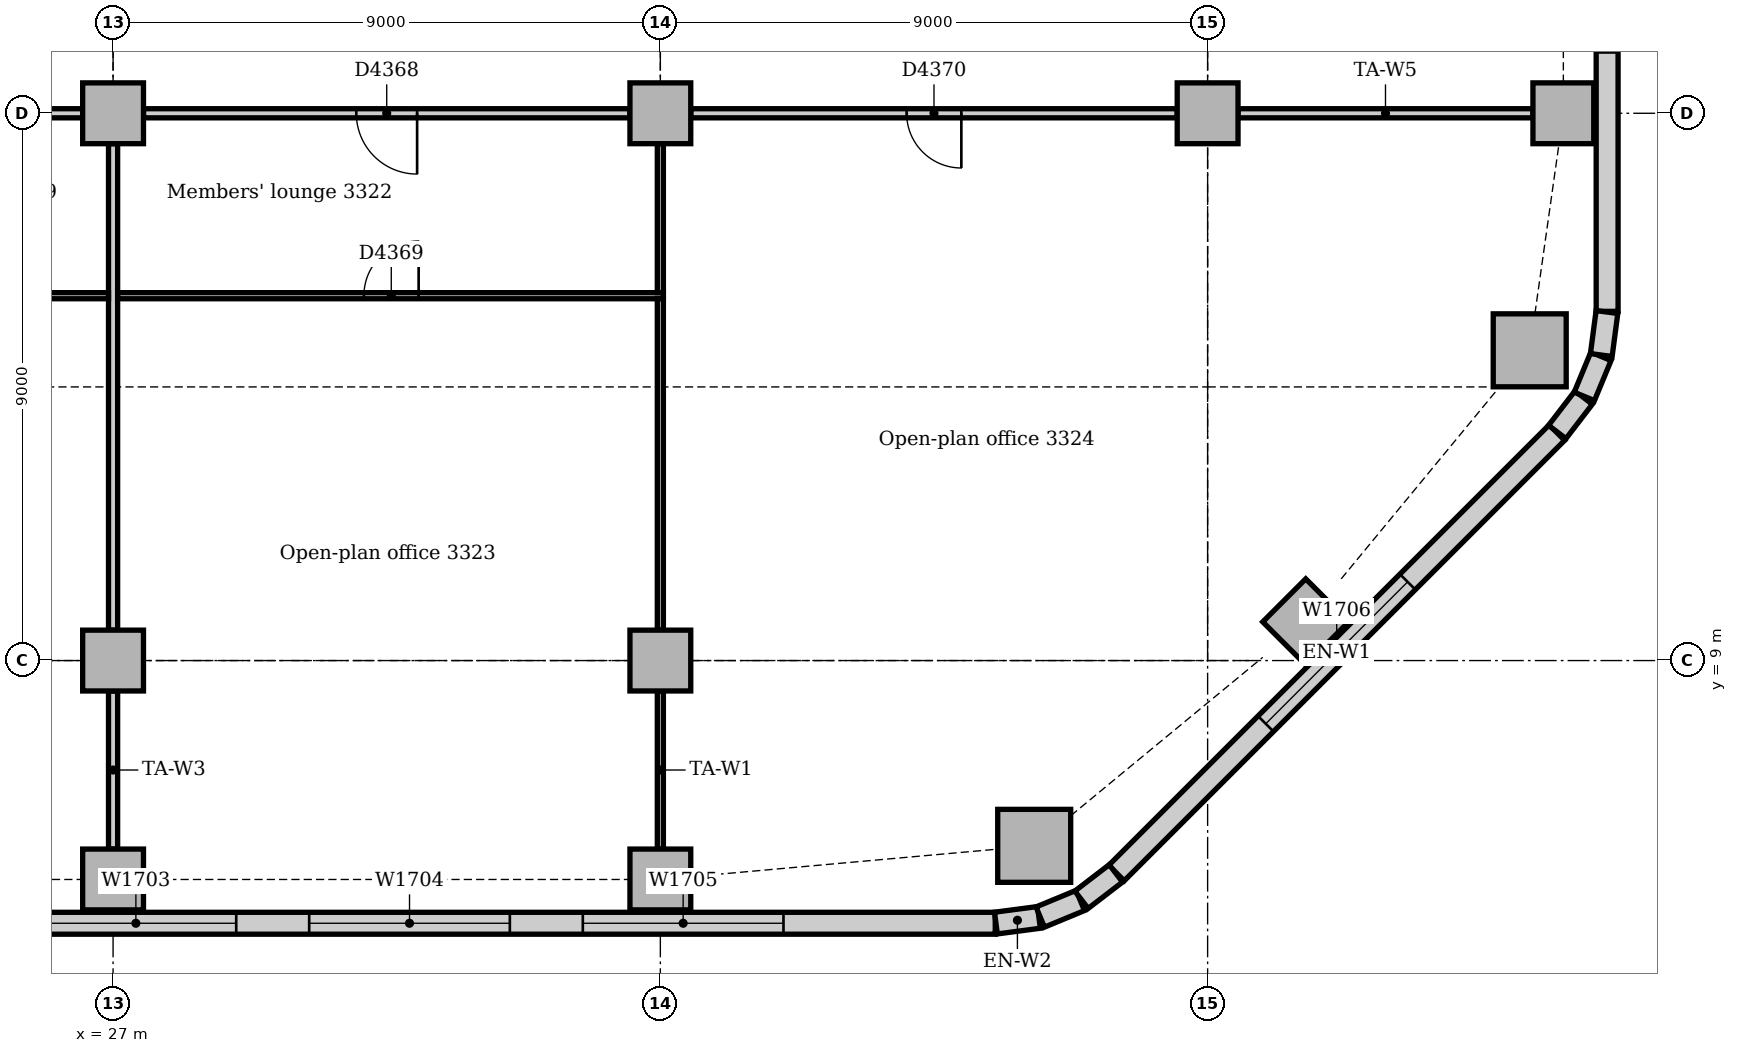
"""IFC4 building model, lengths in metres.
Left out: names, types, materials, properties, quantities, classifications, styles, units other than length and angle.
Written with IfcOpenShell. Run it as: python <this file> out.ifc"""

import sys

from ifc_helpers import new_model, si_unit, direction, frame, frame_2d, origin, origin_2d, place, context, subcontext, project, spatial, rectangle, extrude, element, fill, save


model = new_model("IFC4")
c1 = context("Model", 3, precision=1e-05, world=origin(), true_north=direction((0.0, 1.0)))
c2 = subcontext(c1, "Body", "Model", "MODEL_VIEW")
j1 = project(units=[si_unit("LENGTHUNIT", "METRE"), si_unit("PLANEANGLEUNIT", "RADIAN")], contexts=[c1])
p1 = place(None, origin())
s1 = spatial("IfcSite", under=j1, at=p1, CompositionType="ELEMENT")
p2 = place(p1, origin())
s2 = spatial("IfcBuilding", under=s1, at=p2, CompositionType="ELEMENT")
p3 = place(p2, frame((0.0, 0.0, 140.0)))
s3 = spatial("IfcBuildingStorey", under=s2, at=p3, CompositionType="ELEMENT", Elevation=140.0)
for number, where, z_axis, x_axis in (
    (1, (42.148, 5.953, 0.0), (0.0, 0.0, 1.0), (1.0, 0.0, 0.0)),
    (2, (50.297, 14.102, 0.0), (0.0, 0.0, 1.0), (1.0, 0.0, 0.0)),
):
    element("IfcColumn", number, at=place(p3, frame(where, z_axis=z_axis, x_axis=x_axis)), inside=s3, PredefinedType="COLUMN", context=c2, shape_type="SweptSolid", body=[
        extrude(rectangle(XDim=1.2, YDim=1.2, at=origin_2d()), origin(), (0.0, 0.0, 1.0), 3.7),
    ])
for number, where, z_axis, x_axis in (
    (3, (27.0, 5.4, 0.0), (0.0, 0.0, 1.0), (1.0, 0.0, 0.0)),
    (4, (36.0, 5.4, 0.0), (0.0, 0.0, 1.0), (1.0, 0.0, 0.0)),
    (5, (46.614, 9.636, 0.0), (0.0, 0.0, 1.0), (0.707, 0.707, 0.0)),
    (6, (50.85, 18.0, 0.0), (0.0, 0.0, 1.0), (1.0, 0.0, 0.0)),
    (7, (27.0, 9.0, 0.0), (0.0, 0.0, 1.0), (1.0, 0.0, 0.0)),
    (8, (27.0, 18.0, 0.0), (0.0, 0.0, 1.0), (1.0, 0.0, 0.0)),
    (9, (36.0, 9.0, 0.0), (0.0, 0.0, 1.0), (1.0, 0.0, 0.0)),
    (10, (36.0, 18.0, 0.0), (0.0, 0.0, 1.0), (1.0, 0.0, 0.0)),
    (11, (45.0, 18.0, 0.0), (0.0, 0.0, 1.0), (1.0, 0.0, 0.0)),
):
    element("IfcColumn", number, at=place(p3, frame(where, z_axis=z_axis, x_axis=x_axis)), inside=s3, PredefinedType="COLUMN", context=c2, shape_type="SweptSolid", body=[
        extrude(rectangle(XDim=1.0, YDim=1.0, at=origin_2d()), origin(), (0.0, 0.0, 1.0), 3.7),
    ])
p4 = place(p3, frame((4.243, 4.68, 0.0), z_axis=(0.0, 0.0, 1.0), x_axis=(1.0, 0.0, 0.0)))
e12 = element("IfcWall", 12, at=p4, inside=s3, PredefinedType="STANDARD", context=c2, shape_type="SweptSolid", body=[
    extrude(rectangle(XDim=37.265, YDim=0.36, at=frame_2d((18.632, 0.0))), origin(), (0.0, 0.0, 1.0), 3.7),
])
p5 = place(p4, frame((3.482, 0.0, 0.9)))
e13 = element("IfcOpeningElement", 13, at=p5, cuts=e12, PredefinedType="OPENING", context=c2, shape_type="SweptSolid", body=[
    extrude(rectangle(XDim=3.3, YDim=1.6, at=frame_2d((1.65, 0.8))), frame((0.0, 0.19, 0.0), z_axis=(0.0, -1.0, 0.0), x_axis=(1.0, 0.0, 0.0)), (0.0, 0.0, 1.0), 0.38),
])
p6 = place(p4, frame((7.982, 0.0, 0.9)))
e14 = element("IfcOpeningElement", 14, at=p6, cuts=e12, PredefinedType="OPENING", context=c2, shape_type="SweptSolid", body=[
    extrude(rectangle(XDim=3.3, YDim=1.6, at=frame_2d((1.65, 0.8))), frame((0.0, 0.19, 0.0), z_axis=(0.0, -1.0, 0.0), x_axis=(1.0, 0.0, 0.0)), (0.0, 0.0, 1.0), 0.38),
])
p7 = place(p4, frame((12.482, 0.0, 0.9)))
e15 = element("IfcOpeningElement", 15, at=p7, cuts=e12, PredefinedType="OPENING", context=c2, shape_type="SweptSolid", body=[
    extrude(rectangle(XDim=3.3, YDim=1.6, at=frame_2d((1.65, 0.8))), frame((0.0, 0.19, 0.0), z_axis=(0.0, -1.0, 0.0), x_axis=(1.0, 0.0, 0.0)), (0.0, 0.0, 1.0), 0.38),
])
p8 = place(p4, frame((16.982, 0.0, 0.9)))
e16 = element("IfcOpeningElement", 16, at=p8, cuts=e12, PredefinedType="OPENING", context=c2, shape_type="SweptSolid", body=[
    extrude(rectangle(XDim=3.3, YDim=1.6, at=frame_2d((1.65, 0.8))), frame((0.0, 0.19, 0.0), z_axis=(0.0, -1.0, 0.0), x_axis=(1.0, 0.0, 0.0)), (0.0, 0.0, 1.0), 0.38),
])
p9 = place(p4, frame((21.482, 0.0, 0.9)))
e17 = element("IfcOpeningElement", 17, at=p9, cuts=e12, PredefinedType="OPENING", context=c2, shape_type="SweptSolid", body=[
    extrude(rectangle(XDim=3.3, YDim=1.6, at=frame_2d((1.65, 0.8))), frame((0.0, 0.19, 0.0), z_axis=(0.0, -1.0, 0.0), x_axis=(1.0, 0.0, 0.0)), (0.0, 0.0, 1.0), 0.38),
])
p10 = place(p4, frame((25.982, 0.0, 0.9)))
e18 = element("IfcOpeningElement", 18, at=p10, cuts=e12, PredefinedType="OPENING", context=c2, shape_type="SweptSolid", body=[
    extrude(rectangle(XDim=3.3, YDim=1.6, at=frame_2d((1.65, 0.8))), frame((0.0, 0.19, 0.0), z_axis=(0.0, -1.0, 0.0), x_axis=(1.0, 0.0, 0.0)), (0.0, 0.0, 1.0), 0.38),
])
p11 = place(p4, frame((30.482, 0.0, 0.9)))
e19 = element("IfcOpeningElement", 19, at=p11, cuts=e12, PredefinedType="OPENING", context=c2, shape_type="SweptSolid", body=[
    extrude(rectangle(XDim=3.3, YDim=1.6, at=frame_2d((1.65, 0.8))), frame((0.0, 0.19, 0.0), z_axis=(0.0, -1.0, 0.0), x_axis=(1.0, 0.0, 0.0)), (0.0, 0.0, 1.0), 0.38),
])
p12 = place(p3, frame((43.501, 5.506, 0.0), z_axis=(0.0, 0.0, 1.0), x_axis=(0.707106781187, 0.707106781187, 0.0)))
e20 = element("IfcWall", 20, at=p12, inside=s3, PredefinedType="STANDARD", context=c2, shape_type="SweptSolid", body=[
    extrude(rectangle(XDim=10.243, YDim=0.36, at=frame_2d((5.121, 0.0))), origin(), (0.0, 0.0, 1.0), 3.7),
])
p13 = place(p12, frame((3.471, 0.0, 0.9)))
e21 = element("IfcOpeningElement", 21, at=p13, cuts=e20, PredefinedType="OPENING", context=c2, shape_type="SweptSolid", body=[
    extrude(rectangle(XDim=3.3, YDim=1.6, at=frame_2d((1.65, 0.8))), frame((0.0, 0.19, 0.0), z_axis=(0.0, -1.0, 0.0), x_axis=(1.0, 0.0, 0.0)), (0.0, 0.0, 1.0), 0.38),
])
p14 = place(p3, frame((51.57, 14.743, 0.0), z_axis=(0.0, 0.0, 1.0), x_axis=(0.0, 1.0, 0.0)))
e22 = element("IfcWall", 22, at=p14, inside=s3, PredefinedType="STANDARD", context=c2, shape_type="SweptSolid", body=[
    extrude(rectangle(XDim=24.515, YDim=0.36, at=frame_2d((12.257, 0.0))), origin(), (0.0, 0.0, 1.0), 3.7),
])
p15 = place(p14, frame((4.257, 0.0, 0.9)))
e23 = element("IfcOpeningElement", 23, at=p15, cuts=e22, PredefinedType="OPENING", context=c2, shape_type="SweptSolid", body=[
    extrude(rectangle(XDim=1.8, YDim=1.6, at=frame_2d((0.9, 0.8))), frame((0.0, 0.19, 0.0), z_axis=(0.0, -1.0, 0.0), x_axis=(1.0, 0.0, 0.0)), (0.0, 0.0, 1.0), 0.38),
])
p16 = place(p14, frame((8.357, 0.0, 0.9)))
e24 = element("IfcOpeningElement", 24, at=p16, cuts=e22, PredefinedType="OPENING", context=c2, shape_type="SweptSolid", body=[
    extrude(rectangle(XDim=3.3, YDim=1.6, at=frame_2d((1.65, 0.8))), frame((0.0, 0.19, 0.0), z_axis=(0.0, -1.0, 0.0), x_axis=(1.0, 0.0, 0.0)), (0.0, 0.0, 1.0), 0.38),
])
p17 = place(p14, frame((12.857, 0.0, 0.9)))
e25 = element("IfcOpeningElement", 25, at=p17, cuts=e22, PredefinedType="OPENING", context=c2, shape_type="SweptSolid", body=[
    extrude(rectangle(XDim=3.3, YDim=1.6, at=frame_2d((1.65, 0.8))), frame((0.0, 0.19, 0.0), z_axis=(0.0, -1.0, 0.0), x_axis=(1.0, 0.0, 0.0)), (0.0, 0.0, 1.0), 0.38),
])
p18 = place(p14, frame((17.357, 0.0, 0.9)))
e26 = element("IfcOpeningElement", 26, at=p18, cuts=e22, PredefinedType="OPENING", context=c2, shape_type="SweptSolid", body=[
    extrude(rectangle(XDim=3.3, YDim=1.6, at=frame_2d((1.65, 0.8))), frame((0.0, 0.19, 0.0), z_axis=(0.0, -1.0, 0.0), x_axis=(1.0, 0.0, 0.0)), (0.0, 0.0, 1.0), 0.38),
])
for number, where, z_axis, x_axis in (
    (27, (41.519, 4.683, 0.0), (0.0, 0.0, 1.0), (0.991, 0.131, 0.0)),
    (28, (42.247, 4.782, 0.0), (0.0, 0.0, 1.0), (0.924, 0.383, 0.0)),
):
    element("IfcWall", number, at=place(p3, frame(where, z_axis=z_axis, x_axis=x_axis)), inside=s3, PredefinedType="STANDARD", context=c2, shape_type="SweptSolid", body=[
        extrude(rectangle(XDim=0.713, YDim=0.36, at=frame_2d((0.356, 0.0))), origin(), (0.0, 0.0, 1.0), 3.7),
    ])
for number, where, z_axis, x_axis in (
    (29, (42.925, 5.066, 0.0), (0.0, 0.0, 1.0), (0.793, 0.609, 0.0)),
    (30, (50.75, 12.759, 0.0), (0.0, 0.0, 1.0), (0.609, 0.793, 0.0)),
):
    element("IfcWall", number, at=place(p3, frame(where, z_axis=z_axis, x_axis=x_axis)), inside=s3, PredefinedType="STANDARD", context=c2, shape_type="SweptSolid", body=[
        extrude(rectangle(XDim=0.713, YDim=0.36, at=frame_2d((0.357, 0.0))), origin(), (0.0, 0.0, 1.0), 3.7),
    ])
for number, where, z_axis, x_axis in (
    (31, (51.195, 13.344, 0.0), (0.0, 0.0, 1.0), (0.383, 0.924, 0.0)),
    (32, (51.474, 14.024, 0.0), (0.0, 0.0, 1.0), (0.131, 0.991, 0.0)),
):
    element("IfcWall", number, at=place(p3, frame(where, z_axis=z_axis, x_axis=x_axis)), inside=s3, PredefinedType="STANDARD", context=c2, shape_type="SweptSolid", body=[
        extrude(rectangle(XDim=0.713, YDim=0.36, at=frame_2d((0.356, 0.0))), origin(), (0.0, 0.0, 1.0), 3.7),
    ])
p19 = place(p3, frame((45.5, 18.0, 0.0), z_axis=(0.0, 0.0, 1.0), x_axis=(1.0, 0.0, 0.0)))
e33 = element("IfcWall", 33, at=p19, inside=s3, PredefinedType="PARTITIONING", context=c2, shape_type="SweptSolid", body=[
    extrude(rectangle(XDim=4.85, YDim=0.15, at=frame_2d((2.425, 0.0))), origin(), (0.0, 0.0, 1.0), 3.104),
])
p20 = place(p3, frame((36.5, 18.0, 0.0), z_axis=(0.0, 0.0, 1.0), x_axis=(1.0, 0.0, 0.0)))
e34 = element("IfcWall", 34, at=p20, inside=s3, PredefinedType="PARTITIONING", context=c2, shape_type="SweptSolid", body=[
    extrude(rectangle(XDim=8.0, YDim=0.15, at=frame_2d((4.0, 0.0))), origin(), (0.0, 0.0, 1.0), 3.008),
])
p21 = place(p20, frame((3.55, 0.0, 0.0)))
e35 = element("IfcOpeningElement", 35, at=p21, cuts=e34, PredefinedType="OPENING", context=c2, shape_type="SweptSolid", body=[
    extrude(rectangle(XDim=0.9, YDim=2.1, at=frame_2d((0.45, 1.05))), frame((0.0, 0.085, 0.0), z_axis=(0.0, -1.0, 0.0), x_axis=(1.0, 0.0, 0.0)), (0.0, 0.0, 1.0), 0.17),
])
p22 = place(p3, frame((27.5, 18.0, 0.0), z_axis=(0.0, 0.0, 1.0), x_axis=(1.0, 0.0, 0.0)))
e36 = element("IfcWall", 36, at=p22, inside=s3, PredefinedType="PARTITIONING", context=c2, shape_type="SweptSolid", body=[
    extrude(rectangle(XDim=8.0, YDim=0.15, at=frame_2d((4.0, 0.0))), origin(), (0.0, 0.0, 1.0), 3.008),
])
p23 = place(p22, frame((3.5, 0.0, 0.0)))
e37 = element("IfcOpeningElement", 37, at=p23, cuts=e36, PredefinedType="OPENING", context=c2, shape_type="SweptSolid", body=[
    extrude(rectangle(XDim=1.0, YDim=2.1, at=frame_2d((0.5, 1.05))), frame((0.0, 0.085, 0.0), z_axis=(0.0, -1.0, 0.0), x_axis=(1.0, 0.0, 0.0)), (0.0, 0.0, 1.0), 0.17),
])
p24 = place(p3, frame((18.5, 18.0, 0.0), z_axis=(0.0, 0.0, 1.0), x_axis=(1.0, 0.0, 0.0)))
e38 = element("IfcWall", 38, at=p24, inside=s3, PredefinedType="PARTITIONING", context=c2, shape_type="SweptSolid", body=[
    extrude(rectangle(XDim=8.0, YDim=0.15, at=frame_2d((4.0, 0.0))), origin(), (0.0, 0.0, 1.0), 3.008),
])
p25 = place(p24, frame((3.5, 0.0, 0.0)))
e39 = element("IfcOpeningElement", 39, at=p25, cuts=e38, PredefinedType="OPENING", context=c2, shape_type="SweptSolid", body=[
    extrude(rectangle(XDim=1.0, YDim=2.1, at=frame_2d((0.5, 1.05))), frame((0.0, 0.085, 0.0), z_axis=(0.0, -1.0, 0.0), x_axis=(1.0, 0.0, 0.0)), (0.0, 0.0, 1.0), 0.17),
])
p26 = place(p3, frame((27.0, 5.9, 0.0), z_axis=(0.0, 0.0, 1.0), x_axis=(0.0, 1.0, 0.0)))
e40 = element("IfcWall", 40, at=p26, inside=s3, PredefinedType="PARTITIONING", context=c2, shape_type="SweptSolid", body=[
    extrude(rectangle(XDim=2.6, YDim=0.15, at=frame_2d((1.3, 0.0))), origin(), (0.0, 0.0, 1.0), 3.502),
])
p27 = place(p3, frame((27.0, 9.5, 0.0), z_axis=(0.0, 0.0, 1.0), x_axis=(0.0, 1.0, 0.0)))
e41 = element("IfcWall", 41, at=p27, inside=s3, PredefinedType="PARTITIONING", context=c2, shape_type="SweptSolid", body=[
    extrude(rectangle(XDim=8.0, YDim=0.15, at=frame_2d((4.0, 0.0))), origin(), (0.0, 0.0, 1.0), 3.106),
])
p28 = place(p3, frame((8.95, 15.0, 0.0), z_axis=(0.0, 0.0, 1.0), x_axis=(1.0, 0.0, 0.0)))
e42 = element("IfcWall", 42, at=p28, inside=s3, PredefinedType="PARTITIONING", context=c2, shape_type="SweptSolid", body=[
    extrude(rectangle(XDim=17.975, YDim=0.1, at=frame_2d((8.988, 0.0))), origin(), (0.0, 0.0, 1.0), 3.7),
])
p29 = place(p28, frame((4.15, 0.0, 0.0)))
e43 = element("IfcOpeningElement", 43, at=p29, cuts=e42, PredefinedType="OPENING", context=c2, shape_type="SweptSolid", body=[
    extrude(rectangle(XDim=0.9, YDim=2.1, at=frame_2d((0.45, 1.05))), frame((0.0, 0.06, 0.0), z_axis=(0.0, -1.0, 0.0), x_axis=(1.0, 0.0, 0.0)), (0.0, 0.0, 1.0), 0.12),
])
p30 = place(p28, frame((13.0, 0.0, 0.0)))
e44 = element("IfcOpeningElement", 44, at=p30, cuts=e42, PredefinedType="OPENING", context=c2, shape_type="SweptSolid", body=[
    extrude(rectangle(XDim=0.9, YDim=2.1, at=frame_2d((0.45, 1.05))), frame((0.0, 0.06, 0.0), z_axis=(0.0, -1.0, 0.0), x_axis=(1.0, 0.0, 0.0)), (0.0, 0.0, 1.0), 0.12),
])
p31 = place(p3, frame((27.075, 15.0, 0.0), z_axis=(0.0, 0.0, 1.0), x_axis=(1.0, 0.0, 0.0)))
e45 = element("IfcWall", 45, at=p31, inside=s3, PredefinedType="PARTITIONING", context=c2, shape_type="SweptSolid", body=[
    extrude(rectangle(XDim=8.975, YDim=0.1, at=frame_2d((4.487, 0.0))), origin(), (0.0, 0.0, 1.0), 3.7),
])
p32 = place(p31, frame((4.05, 0.0, 0.0)))
e46 = element("IfcOpeningElement", 46, at=p32, cuts=e45, PredefinedType="OPENING", context=c2, shape_type="SweptSolid", body=[
    extrude(rectangle(XDim=0.9, YDim=2.1, at=frame_2d((0.45, 1.05))), frame((0.0, 0.06, 0.0), z_axis=(0.0, -1.0, 0.0), x_axis=(1.0, 0.0, 0.0)), (0.0, 0.0, 1.0), 0.12),
])
p33 = place(p3, frame((36.0, 5.9, 0.0), z_axis=(0.0, 0.0, 1.0), x_axis=(0.0, 1.0, 0.0)))
e47 = element("IfcWall", 47, at=p33, inside=s3, PredefinedType="PARTITIONING", context=c2, shape_type="SweptSolid", body=[
    extrude(rectangle(XDim=2.6, YDim=0.1, at=frame_2d((1.3, 0.0))), origin(), (0.0, 0.0, 1.0), 3.502),
])
p34 = place(p3, frame((36.0, 15.05, 0.0), z_axis=(0.0, 0.0, 1.0), x_axis=(0.0, 1.0, 0.0)))
e48 = element("IfcWall", 48, at=p34, inside=s3, PredefinedType="PARTITIONING", context=c2, shape_type="SweptSolid", body=[
    extrude(rectangle(XDim=2.45, YDim=0.1, at=frame_2d((1.225, 0.0))), origin(), (0.0, 0.0, 1.0), 3.106),
])
p35 = place(p3, frame((36.0, 9.5, 0.0), z_axis=(0.0, 0.0, 1.0), x_axis=(0.0, 1.0, 0.0)))
e49 = element("IfcWall", 49, at=p35, inside=s3, PredefinedType="PARTITIONING", context=c2, shape_type="SweptSolid", body=[
    extrude(rectangle(XDim=5.45, YDim=0.1, at=frame_2d((2.725, 0.0))), origin(), (0.0, 0.0, 1.0), 3.106),
])
p36 = place(p9, origin())
e50 = element("IfcWindow", 50, at=p36, inside=s3, PartitioningType="SINGLE_PANEL", PredefinedType="WINDOW", context=c2, shape_type="SweptSolid", body=[
    extrude(rectangle(XDim=3.3, YDim=1.6, at=frame_2d((1.65, 0.8))), frame((0.0, 0.13, 0.0), z_axis=(0.0, -1.0, 0.0), x_axis=(1.0, 0.0, 0.0)), (0.0, 0.0, 1.0), 0.06),
])
fill(e17, e50)
p37 = place(p10, origin())
e51 = element("IfcWindow", 51, at=p37, inside=s3, PartitioningType="SINGLE_PANEL", PredefinedType="WINDOW", context=c2, shape_type="SweptSolid", body=[
    extrude(rectangle(XDim=3.3, YDim=1.6, at=frame_2d((1.65, 0.8))), frame((0.0, 0.13, 0.0), z_axis=(0.0, -1.0, 0.0), x_axis=(1.0, 0.0, 0.0)), (0.0, 0.0, 1.0), 0.06),
])
fill(e18, e51)
p38 = place(p11, origin())
e52 = element("IfcWindow", 52, at=p38, inside=s3, PartitioningType="SINGLE_PANEL", PredefinedType="WINDOW", context=c2, shape_type="SweptSolid", body=[
    extrude(rectangle(XDim=3.3, YDim=1.6, at=frame_2d((1.65, 0.8))), frame((0.0, 0.13, 0.0), z_axis=(0.0, -1.0, 0.0), x_axis=(1.0, 0.0, 0.0)), (0.0, 0.0, 1.0), 0.06),
])
fill(e19, e52)
p39 = place(p13, origin())
e53 = element("IfcWindow", 53, at=p39, inside=s3, PartitioningType="SINGLE_PANEL", PredefinedType="WINDOW", context=c2, shape_type="SweptSolid", body=[
    extrude(rectangle(XDim=3.3, YDim=1.6, at=frame_2d((1.65, 0.8))), frame((0.0, 0.13, 0.0), z_axis=(0.0, -1.0, 0.0), x_axis=(1.0, 0.0, 0.0)), (0.0, 0.0, 1.0), 0.06),
])
fill(e21, e53)
p40 = place(p23, frame((1.0, 0.0, 0.0), z_axis=(0.0, 0.0, 1.0), x_axis=(-1.0, 0.0, 0.0)))
e54 = element("IfcDoor", 54, at=p40, inside=s3, OperationType="SINGLE_SWING_LEFT", PredefinedType="DOOR", context=c2, shape_type="SweptSolid", body=[
    extrude(rectangle(XDim=1.0, YDim=2.1, at=frame_2d((0.5, 1.05))), frame((0.0, 0.025, 0.0), z_axis=(0.0, -1.0, 0.0), x_axis=(1.0, 0.0, 0.0)), (0.0, 0.0, 1.0), 0.05),
])
fill(e37, e54)
p41 = place(p32, origin())
e55 = element("IfcDoor", 55, at=p41, inside=s3, OperationType="SINGLE_SWING_RIGHT", PredefinedType="DOOR", context=c2, shape_type="SweptSolid", body=[
    extrude(rectangle(XDim=0.9, YDim=2.1, at=frame_2d((0.45, 1.05))), frame((0.0, 0.025, 0.0), z_axis=(0.0, -1.0, 0.0), x_axis=(1.0, 0.0, 0.0)), (0.0, 0.0, 1.0), 0.05),
])
fill(e46, e55)
p42 = place(p21, frame((0.9, 0.0, 0.0), z_axis=(0.0, 0.0, 1.0), x_axis=(-1.0, 0.0, 0.0)))
e56 = element("IfcDoor", 56, at=p42, inside=s3, OperationType="SINGLE_SWING_LEFT", PredefinedType="DOOR", context=c2, shape_type="SweptSolid", body=[
    extrude(rectangle(XDim=0.9, YDim=2.1, at=frame_2d((0.45, 1.05))), frame((0.0, 0.025, 0.0), z_axis=(0.0, -1.0, 0.0), x_axis=(1.0, 0.0, 0.0)), (0.0, 0.0, 1.0), 0.05),
])
fill(e35, e56)
save(model, sys.argv[1])
